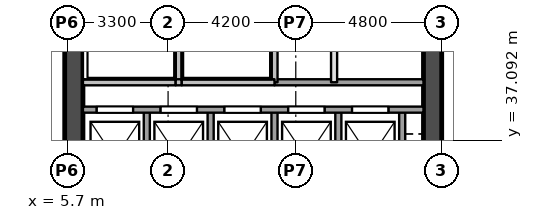
"""IFC4 building model, lengths in metres.
Left out: names, types, materials, properties, quantities, classifications, styles, units other than length and angle.
Written with IfcOpenShell. Run it as: python <this file> out.ifc"""

import sys

from ifc_helpers import new_model, si_unit, direction, frame, frame_2d, origin, place, context, subcontext, project, spatial, rectangle, extrude, element, fill, save


model = new_model("IFC4")
c1 = context("Model", 3, precision=1e-05, world=origin(), true_north=direction((0.0, 1.0)))
c2 = subcontext(c1, "Body", "Model", "MODEL_VIEW")
j1 = project(units=[si_unit("LENGTHUNIT", "METRE"), si_unit("PLANEANGLEUNIT", "RADIAN")], contexts=[c1])
p1 = place(None, origin())
s1 = spatial("IfcSite", under=j1, at=p1, CompositionType="ELEMENT")
p2 = place(p1, origin())
s2 = spatial("IfcBuilding", under=s1, at=p2, CompositionType="ELEMENT")
p3 = place(p2, origin())
s3 = spatial("IfcBuildingStorey", under=s2, at=p3, CompositionType="ELEMENT", Elevation=0.0)
p4 = place(p3, frame((5.9, 29.1, 0.0), z_axis=(0.0, 0.0, 1.0), x_axis=(0.0, 1.0, 0.0)))
e1 = element("IfcWall", 1, at=p4, inside=s3, PredefinedType="SHEAR", context=c2, shape_type="SweptSolid", body=[
    extrude(rectangle(XDim=20.3, YDim=0.6, at=frame_2d((10.15, 0.0))), origin(), (0.0, 0.0, 1.0), 7.59),
])
p5 = place(p4, frame((3.6, 0.0, 0.0)))
e2 = element("IfcOpeningElement", 2, at=p5, cuts=e1, PredefinedType="OPENING", context=c2, shape_type="SweptSolid", body=[
    extrude(rectangle(XDim=1.8, YDim=2.1, at=frame_2d((0.9, 1.05))), frame((0.0, 0.31, 0.0), z_axis=(0.0, -1.0, 0.0), x_axis=(1.0, 0.0, 0.0)), (0.0, 0.0, 1.0), 0.62),
])
p6 = place(p4, frame((17.1, 0.0, 0.0)))
e3 = element("IfcOpeningElement", 3, at=p6, cuts=e1, PredefinedType="OPENING", context=c2, shape_type="SweptSolid", body=[
    extrude(rectangle(XDim=1.8, YDim=2.1, at=frame_2d((0.9, 1.05))), frame((0.0, 0.31, 0.0), z_axis=(0.0, -1.0, 0.0), x_axis=(1.0, 0.0, 0.0)), (0.0, 0.0, 1.0), 0.62),
])
p7 = place(p3, frame((17.7, 29.1, 0.0), z_axis=(0.0, 0.0, 1.0), x_axis=(0.0, 1.0, 0.0)))
e4 = element("IfcWall", 4, at=p7, inside=s3, PredefinedType="SHEAR", context=c2, shape_type="SweptSolid", body=[
    extrude(rectangle(XDim=20.3, YDim=0.6, at=frame_2d((10.15, 0.0))), origin(), (0.0, 0.0, 1.0), 7.59),
])
p8 = place(p7, frame((1.25, 0.0, 0.0)))
e5 = element("IfcOpeningElement", 5, at=p8, cuts=e4, PredefinedType="OPENING", context=c2, shape_type="SweptSolid", body=[
    extrude(rectangle(XDim=0.7, YDim=2.1, at=frame_2d((0.35, 1.05))), frame((0.0, 0.31, 0.0), z_axis=(0.0, -1.0, 0.0), x_axis=(1.0, 0.0, 0.0)), (0.0, 0.0, 1.0), 0.62),
])
p9 = place(p7, frame((7.05, 0.0, 0.0)))
e6 = element("IfcOpeningElement", 6, at=p9, cuts=e4, PredefinedType="OPENING", context=c2, shape_type="SweptSolid", body=[
    extrude(rectangle(XDim=0.7, YDim=2.1, at=frame_2d((0.35, 1.05))), frame((0.0, 0.31, 0.0), z_axis=(0.0, -1.0, 0.0), x_axis=(1.0, 0.0, 0.0)), (0.0, 0.0, 1.0), 0.62),
])
p10 = place(p7, frame((17.95, 0.0, 0.0), z_axis=(0.0, 0.0, 1.0), x_axis=(-1.0, 0.0, 0.0)))
e7 = element("IfcOpeningElement", 7, at=p10, cuts=e4, PredefinedType="OPENING", context=c2, shape_type="SweptSolid", body=[
    extrude(rectangle(XDim=1.8, YDim=2.4, at=frame_2d((0.9, 1.2))), frame((0.0, 0.31, 0.0), z_axis=(0.0, -1.0, 0.0), x_axis=(1.0, 0.0, 0.0)), (0.0, 0.0, 1.0), 0.62),
])
p11 = place(p7, frame((19.85, 0.0, 0.0), z_axis=(0.0, 0.0, 1.0), x_axis=(-1.0, 0.0, 0.0)))
e8 = element("IfcOpeningElement", 8, at=p11, cuts=e4, PredefinedType="OPENING", context=c2, shape_type="SweptSolid", body=[
    extrude(rectangle(XDim=1.8, YDim=2.4, at=frame_2d((0.9, 1.2))), frame((0.0, 0.31, 0.0), z_axis=(0.0, -1.0, 0.0), x_axis=(1.0, 0.0, 0.0)), (0.0, 0.0, 1.0), 0.62),
])
p12 = place(p3, frame((8.3, 34.9, 0.0), z_axis=(0.0, 0.0, 1.0), x_axis=(0.0, 1.0, 0.0)))
e9 = element("IfcWall", 9, at=p12, inside=s3, PredefinedType="SOLIDWALL", context=c2, shape_type="SweptSolid", body=[
    extrude(rectangle(XDim=3.2, YDim=0.2, at=frame_2d((1.6, 0.0))), origin(), (0.0, 0.0, 1.0), 7.59),
])
p13 = place(p3, frame((9.35, 39.0, 0.0), z_axis=(0.0, 0.0, 1.0), x_axis=(0.0, 1.0, 0.0)))
e10 = element("IfcWall", 10, at=p13, inside=s3, PredefinedType="SOLIDWALL", context=c2, shape_type="SweptSolid", body=[
    extrude(rectangle(XDim=1.62, YDim=0.2, at=frame_2d((0.81, 0.0))), origin(), (0.0, 0.0, 1.0), 7.59),
])
for number, where, z_axis, x_axis in (
    (11, (10.4, 34.9, 0.0), (0.0, 0.0, 1.0), (0.0, 1.0, 0.0)),
    (12, (12.5, 34.9, 0.0), (0.0, 0.0, 1.0), (0.0, 1.0, 0.0)),
):
    element("IfcWall", number, at=place(p3, frame(where, z_axis=z_axis, x_axis=x_axis)), inside=s3, PredefinedType="SOLIDWALL", context=c2, shape_type="SweptSolid", body=[
        extrude(rectangle(XDim=3.2, YDim=0.2, at=frame_2d((1.6, 0.0))), origin(), (0.0, 0.0, 1.0), 7.59),
    ])
p14 = place(p3, frame((12.5, 39.0, 0.0), z_axis=(0.0, 0.0, 1.0), x_axis=(0.0, 1.0, 0.0)))
e13 = element("IfcWall", 13, at=p14, inside=s3, PredefinedType="SOLIDWALL", context=c2, shape_type="SweptSolid", body=[
    extrude(rectangle(XDim=1.62, YDim=0.2, at=frame_2d((0.81, 0.0))), origin(), (0.0, 0.0, 1.0), 7.59),
])
p15 = place(p3, frame((14.46, 39.0, 0.0), z_axis=(0.0, 0.0, 1.0), x_axis=(0.0, 1.0, 0.0)))
e14 = element("IfcWall", 14, at=p15, inside=s3, PredefinedType="PARTITIONING", context=c2, shape_type="SweptSolid", body=[
    extrude(rectangle(XDim=6.2, YDim=0.2, at=frame_2d((3.1, 0.0))), origin(), (0.0, 0.0, 1.0), 7.59),
])
for number, where, z_axis, x_axis in (
    (15, (14.6, 34.9, 0.0), (0.0, 0.0, 1.0), (0.0, 1.0, 0.0)),
    (16, (16.7, 34.9, 0.0), (0.0, 0.0, 1.0), (0.0, 1.0, 0.0)),
):
    element("IfcWall", number, at=place(p3, frame(where, z_axis=z_axis, x_axis=x_axis)), inside=s3, PredefinedType="SOLIDWALL", context=c2, shape_type="SweptSolid", body=[
        extrude(rectangle(XDim=3.2, YDim=0.2, at=frame_2d((1.6, 0.0))), origin(), (0.0, 0.0, 1.0), 7.59),
    ])
p16 = place(p3, frame((6.2, 38.1, 0.0), z_axis=(0.0, 0.0, 1.0), x_axis=(1.0, 0.0, 0.0)))
e17 = element("IfcWall", 17, at=p16, inside=s3, PredefinedType="SOLIDWALL", context=c2, shape_type="SweptSolid", body=[
    extrude(rectangle(XDim=11.2, YDim=0.2, at=frame_2d((5.6, 0.0))), origin(), (0.0, 0.0, 1.0), 7.59),
])
p17 = place(p16, frame((0.45, 0.0, 0.0)))
e18 = element("IfcOpeningElement", 18, at=p17, cuts=e17, PredefinedType="OPENING", context=c2, shape_type="SweptSolid", body=[
    extrude(rectangle(XDim=1.2, YDim=2.1, at=frame_2d((0.6, 1.05))), frame((0.0, 0.11, 0.0), z_axis=(0.0, -1.0, 0.0), x_axis=(1.0, 0.0, 0.0)), (0.0, 0.0, 1.0), 0.22),
])
p18 = place(p16, frame((2.55, 0.0, 0.0)))
e19 = element("IfcOpeningElement", 19, at=p18, cuts=e17, PredefinedType="OPENING", context=c2, shape_type="SweptSolid", body=[
    extrude(rectangle(XDim=1.2, YDim=2.1, at=frame_2d((0.6, 1.05))), frame((0.0, 0.11, 0.0), z_axis=(0.0, -1.0, 0.0), x_axis=(1.0, 0.0, 0.0)), (0.0, 0.0, 1.0), 0.22),
])
p19 = place(p16, frame((4.65, 0.0, 0.0)))
e20 = element("IfcOpeningElement", 20, at=p19, cuts=e17, PredefinedType="OPENING", context=c2, shape_type="SweptSolid", body=[
    extrude(rectangle(XDim=1.2, YDim=2.1, at=frame_2d((0.6, 1.05))), frame((0.0, 0.11, 0.0), z_axis=(0.0, -1.0, 0.0), x_axis=(1.0, 0.0, 0.0)), (0.0, 0.0, 1.0), 0.22),
])
p20 = place(p16, frame((6.75, 0.0, 0.0)))
e21 = element("IfcOpeningElement", 21, at=p20, cuts=e17, PredefinedType="OPENING", context=c2, shape_type="SweptSolid", body=[
    extrude(rectangle(XDim=1.2, YDim=2.1, at=frame_2d((0.6, 1.05))), frame((0.0, 0.11, 0.0), z_axis=(0.0, -1.0, 0.0), x_axis=(1.0, 0.0, 0.0)), (0.0, 0.0, 1.0), 0.22),
])
p21 = place(p16, frame((8.85, 0.0, 0.0)))
e22 = element("IfcOpeningElement", 22, at=p21, cuts=e17, PredefinedType="OPENING", context=c2, shape_type="SweptSolid", body=[
    extrude(rectangle(XDim=1.2, YDim=2.1, at=frame_2d((0.6, 1.05))), frame((0.0, 0.11, 0.0), z_axis=(0.0, -1.0, 0.0), x_axis=(1.0, 0.0, 0.0)), (0.0, 0.0, 1.0), 0.22),
])
p22 = place(p3, frame((12.5, 39.0, 0.0), z_axis=(0.0, 0.0, 1.0), x_axis=(1.0, 0.0, 0.0)))
e23 = element("IfcWall", 23, at=p22, inside=s3, PredefinedType="SOLIDWALL", context=c2, shape_type="SweptSolid", body=[
    extrude(rectangle(XDim=4.9, YDim=0.2, at=frame_2d((2.45, 0.0))), origin(), (0.0, 0.0, 1.0), 7.59),
])
p23 = place(p3, frame((6.2, 39.0, 0.0), z_axis=(0.0, 0.0, 1.0), x_axis=(1.0, 0.0, 0.0)))
e24 = element("IfcWall", 24, at=p23, inside=s3, PredefinedType="SOLIDWALL", context=c2, shape_type="SweptSolid", body=[
    extrude(rectangle(XDim=3.05, YDim=0.2, at=frame_2d((1.525, 0.0))), origin(), (0.0, 0.0, 1.0), 7.59),
])
p24 = place(p3, frame((9.25, 39.0, 0.0), z_axis=(0.0, 0.0, 1.0), x_axis=(1.0, 0.0, 0.0)))
e25 = element("IfcWall", 25, at=p24, inside=s3, PredefinedType="SOLIDWALL", context=c2, shape_type="SweptSolid", body=[
    extrude(rectangle(XDim=0.2, YDim=0.2, at=frame_2d((0.1, 0.0))), origin(), (0.0, 0.0, 1.0), 7.59),
])
p25 = place(p3, frame((9.45, 39.0, 0.0), z_axis=(0.0, 0.0, 1.0), x_axis=(1.0, 0.0, 0.0)))
e26 = element("IfcWall", 26, at=p25, inside=s3, PredefinedType="SOLIDWALL", context=c2, shape_type="SweptSolid", body=[
    extrude(rectangle(XDim=3.05, YDim=0.2, at=frame_2d((1.525, 0.0))), origin(), (0.0, 0.0, 1.0), 7.59),
])
p26 = place(p17, origin())
e27 = element("IfcDoor", 27, at=p26, inside=s3, OperationType="SLIDING_TO_LEFT", PredefinedType="DOOR", context=c2, shape_type="SweptSolid", body=[
    extrude(rectangle(XDim=1.2, YDim=2.1, at=frame_2d((0.6, 1.05))), frame((0.0, 0.025, 0.0), z_axis=(0.0, -1.0, 0.0), x_axis=(1.0, 0.0, 0.0)), (0.0, 0.0, 1.0), 0.05),
])
fill(e18, e27)
p27 = place(p18, origin())
e28 = element("IfcDoor", 28, at=p27, inside=s3, OperationType="SLIDING_TO_LEFT", PredefinedType="DOOR", context=c2, shape_type="SweptSolid", body=[
    extrude(rectangle(XDim=1.2, YDim=2.1, at=frame_2d((0.6, 1.05))), frame((0.0, 0.025, 0.0), z_axis=(0.0, -1.0, 0.0), x_axis=(1.0, 0.0, 0.0)), (0.0, 0.0, 1.0), 0.05),
])
fill(e19, e28)
p28 = place(p19, origin())
e29 = element("IfcDoor", 29, at=p28, inside=s3, OperationType="SLIDING_TO_LEFT", PredefinedType="DOOR", context=c2, shape_type="SweptSolid", body=[
    extrude(rectangle(XDim=1.2, YDim=2.1, at=frame_2d((0.6, 1.05))), frame((0.0, 0.025, 0.0), z_axis=(0.0, -1.0, 0.0), x_axis=(1.0, 0.0, 0.0)), (0.0, 0.0, 1.0), 0.05),
])
fill(e20, e29)
p29 = place(p20, origin())
e30 = element("IfcDoor", 30, at=p29, inside=s3, OperationType="SLIDING_TO_LEFT", PredefinedType="DOOR", context=c2, shape_type="SweptSolid", body=[
    extrude(rectangle(XDim=1.2, YDim=2.1, at=frame_2d((0.6, 1.05))), frame((0.0, 0.025, 0.0), z_axis=(0.0, -1.0, 0.0), x_axis=(1.0, 0.0, 0.0)), (0.0, 0.0, 1.0), 0.05),
])
fill(e21, e30)
p30 = place(p21, origin())
e31 = element("IfcDoor", 31, at=p30, inside=s3, OperationType="SLIDING_TO_LEFT", PredefinedType="DOOR", context=c2, shape_type="SweptSolid", body=[
    extrude(rectangle(XDim=1.2, YDim=2.1, at=frame_2d((0.6, 1.05))), frame((0.0, 0.025, 0.0), z_axis=(0.0, -1.0, 0.0), x_axis=(1.0, 0.0, 0.0)), (0.0, 0.0, 1.0), 0.05),
])
fill(e22, e31)
save(model, sys.argv[1])
